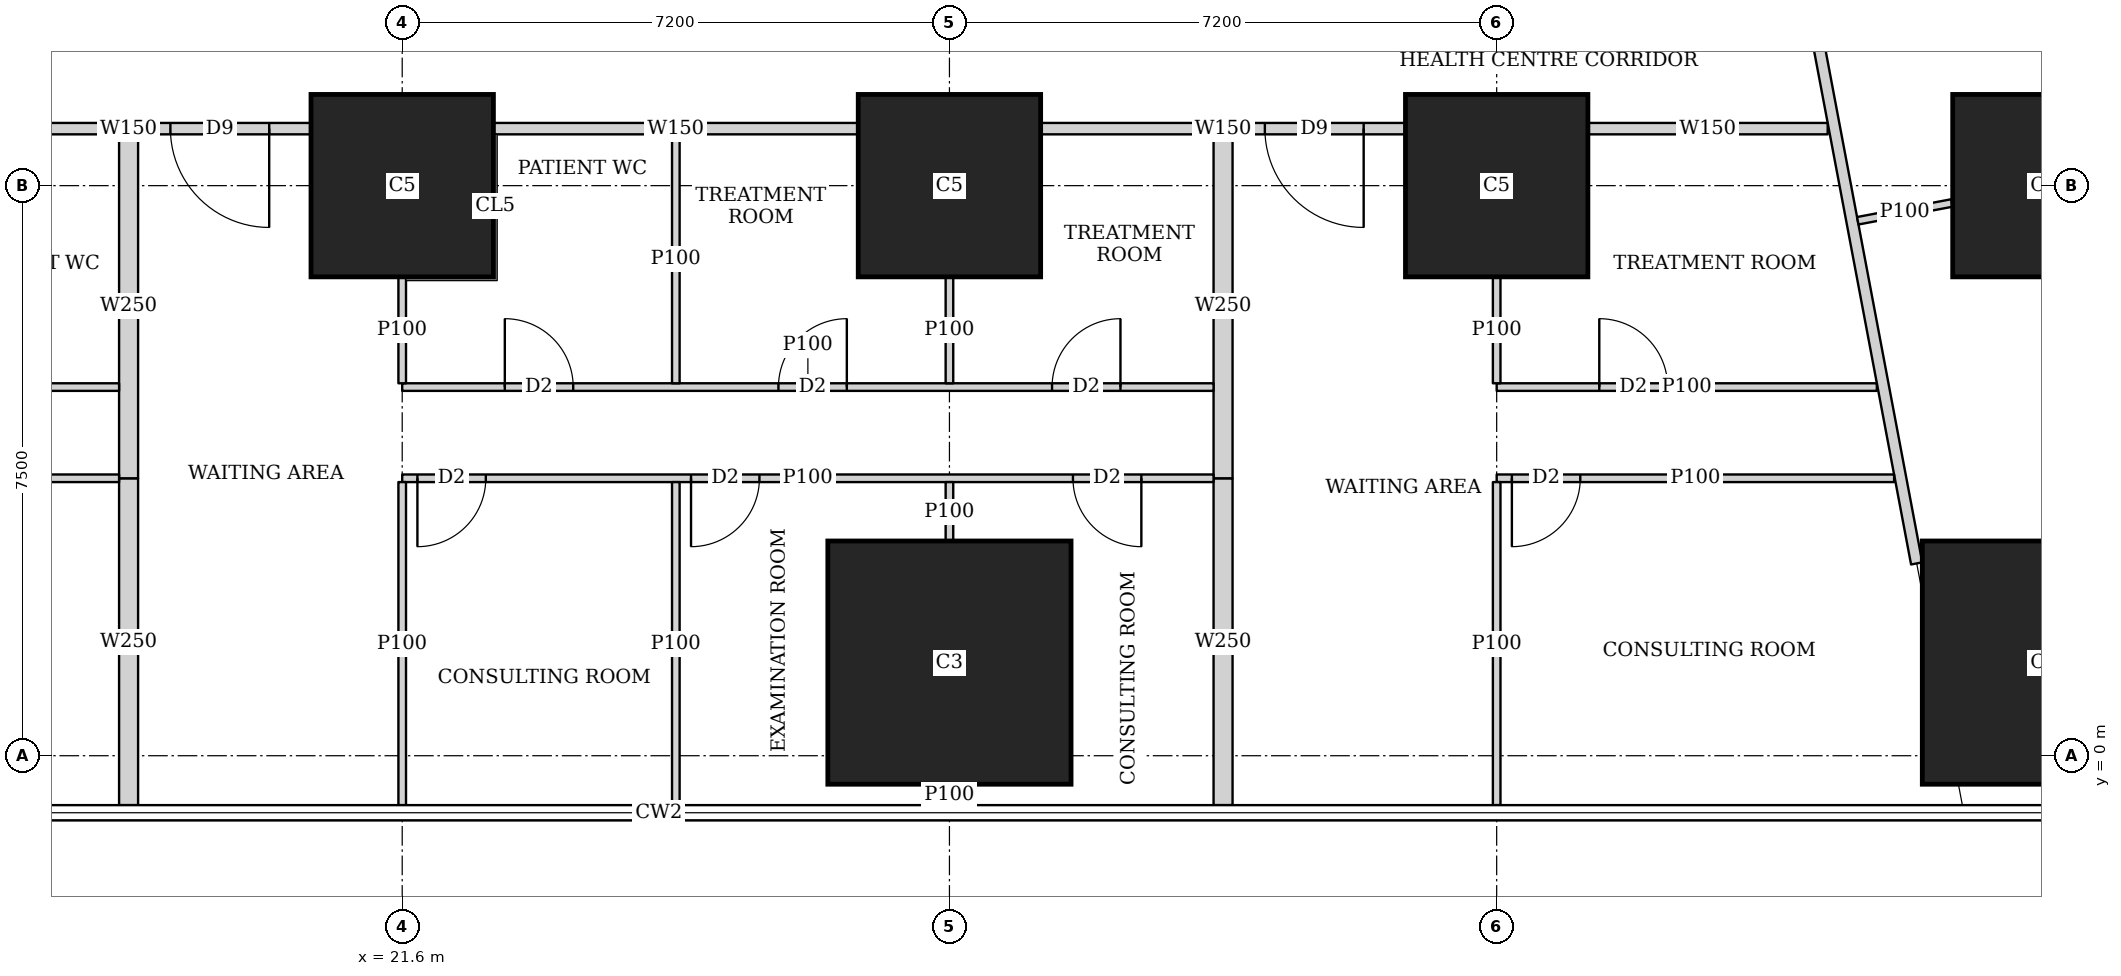
"""IFC4 building model, lengths in metres.
Left out: names, types, materials, properties, quantities, classifications, styles, units other than length and angle.
Written with IfcOpenShell. Run it as: python <this file> out.ifc"""

import sys

from ifc_helpers import new_model, si_unit, direction, frame, frame_2d, origin, origin_2d, place, context, subcontext, project, spatial, rectangle, extrude, element, fill, save


model = new_model("IFC4")
c1 = context("Model", 3, precision=1e-05, world=origin(), true_north=direction((0.0, 1.0)))
c2 = subcontext(c1, "Body", "Model", "MODEL_VIEW")
j1 = project(units=[si_unit("LENGTHUNIT", "METRE"), si_unit("PLANEANGLEUNIT", "RADIAN")], contexts=[c1])
p1 = place(None, origin())
s1 = spatial("IfcSite", under=j1, at=p1, CompositionType="ELEMENT")
p2 = place(p1, origin())
s2 = spatial("IfcBuilding", under=s1, at=p2, CompositionType="ELEMENT")
p3 = place(p2, frame((0.0, 0.0, 5.6)))
s3 = spatial("IfcBuildingStorey", under=s2, at=p3, CompositionType="ELEMENT", Elevation=5.6)
for number, where, z_axis, x_axis in (
    (1, (28.8, 1.225, 0.0), (0.0, 0.0, 1.0), (1.0, 0.0, 0.0)),
    (2, (43.2, 1.225, 0.0), (0.0, 0.0, 1.0), (1.0, 0.0, 0.0)),
):
    element("IfcColumn", number, at=place(p3, frame(where, z_axis=z_axis, x_axis=x_axis)), inside=s3, PredefinedType="COLUMN", context=c2, shape_type="SweptSolid", body=[
        extrude(rectangle(XDim=3.2, YDim=3.2, at=origin_2d()), origin(), (0.0, 0.0, 1.0), 4.5),
    ])
for number, where, z_axis, x_axis in (
    (3, (21.6, 7.5, 0.0), (0.0, 0.0, 1.0), (1.0, 0.0, 0.0)),
    (4, (28.8, 7.5, 0.0), (0.0, 0.0, 1.0), (1.0, 0.0, 0.0)),
    (5, (36.0, 7.5, 0.0), (0.0, 0.0, 1.0), (1.0, 0.0, 0.0)),
    (6, (43.2, 7.5, 0.0), (0.0, 0.0, 1.0), (1.0, 0.0, 0.0)),
):
    element("IfcColumn", number, at=place(p3, frame(where, z_axis=z_axis, x_axis=x_axis)), inside=s3, PredefinedType="COLUMN", context=c2, shape_type="SweptSolid", body=[
        extrude(rectangle(XDim=2.4, YDim=2.4, at=origin_2d()), origin(), (0.0, 0.0, 1.0), 4.5),
    ])
p4 = place(p3, frame((40.355, 8.25, 0.0), z_axis=(0.0, 0.0, 1.0), x_axis=(-1.0, 0.0, 0.0)))
e7 = element("IfcWall", 7, at=p4, inside=s3, PredefinedType="SOLIDWALL", context=c2, shape_type="SweptSolid", body=[
    extrude(rectangle(XDim=3.154, YDim=0.15, at=frame_2d((1.577, 0.0))), origin(), (0.0, 0.0, 1.0), 2.6),
])
p5 = place(p3, frame((34.799, 8.25, 0.0), z_axis=(0.0, 0.0, 1.0), x_axis=(-1.0, 0.0, 0.0)))
e8 = element("IfcWall", 8, at=p5, inside=s3, PredefinedType="SOLIDWALL", context=c2, shape_type="SweptSolid", body=[
    extrude(rectangle(XDim=4.798, YDim=0.15, at=frame_2d((2.399, 0.0))), origin(), (0.0, 0.0, 1.0), 2.6),
])
p6 = place(p5, frame((0.549, 0.0, 0.0)))
e9 = element("IfcOpeningElement", 9, at=p6, cuts=e8, PredefinedType="OPENING", context=c2, shape_type="SweptSolid", body=[
    extrude(rectangle(XDim=1.3, YDim=2.1, at=frame_2d((0.65, 1.05))), frame((0.0, 0.085, 0.0), z_axis=(0.0, -1.0, 0.0), x_axis=(1.0, 0.0, 0.0)), (0.0, 0.0, 1.0), 0.17),
])
p7 = place(p3, frame((27.599, 8.25, 0.0), z_axis=(0.0, 0.0, 1.0), x_axis=(-1.0, 0.0, 0.0)))
e10 = element("IfcWall", 10, at=p7, inside=s3, PredefinedType="SOLIDWALL", context=c2, shape_type="SweptSolid", body=[
    extrude(rectangle(XDim=4.798, YDim=0.15, at=frame_2d((2.399, 0.0))), origin(), (0.0, 0.0, 1.0), 2.6),
])
p8 = place(p3, frame((20.399, 8.25, 0.0), z_axis=(0.0, 0.0, 1.0), x_axis=(-1.0, 0.0, 0.0)))
e11 = element("IfcWall", 11, at=p8, inside=s3, PredefinedType="SOLIDWALL", context=c2, shape_type="SweptSolid", body=[
    extrude(rectangle(XDim=4.798, YDim=0.15, at=frame_2d((2.399, 0.0))), origin(), (0.0, 0.0, 1.0), 2.6),
])
p9 = place(p8, frame((0.549, 0.0, 0.0)))
e12 = element("IfcOpeningElement", 12, at=p9, cuts=e11, PredefinedType="OPENING", context=c2, shape_type="SweptSolid", body=[
    extrude(rectangle(XDim=1.3, YDim=2.1, at=frame_2d((0.65, 1.05))), frame((0.0, 0.085, 0.0), z_axis=(0.0, -1.0, 0.0), x_axis=(1.0, 0.0, 0.0)), (0.0, 0.0, 1.0), 0.17),
])
p10 = place(p3, frame((35.151, 36.285, 0.0), z_axis=(0.0, 0.0, 1.0), x_axis=(0.18558085056, -0.982628998099, 0.0)))
e13 = element("IfcWall", 13, at=p10, inside=s3, PredefinedType="SOLIDWALL", context=c2, shape_type="SweptSolid", body=[
    extrude(rectangle(XDim=34.352, YDim=0.15, at=frame_2d((17.176, 0.0))), origin(), (0.0, 0.0, 1.0), 2.4),
])
p11 = place(p10, frame((13.189, 0.0, 0.0)))
e14 = element("IfcOpeningElement", 14, at=p11, cuts=e13, PredefinedType="OPENING", context=c2, shape_type="SweptSolid", body=[
    extrude(rectangle(XDim=1.3, YDim=2.1, at=frame_2d((0.65, 1.05))), frame((0.0, 0.085, 0.0), z_axis=(0.0, -1.0, 0.0), x_axis=(1.0, 0.0, 0.0)), (0.0, 0.0, 1.0), 0.17),
])
p12 = place(p10, frame((19.443, 0.0, 0.0)))
e15 = element("IfcOpeningElement", 15, at=p12, cuts=e13, PredefinedType="OPENING", context=c2, shape_type="SweptSolid", body=[
    extrude(rectangle(XDim=1.3, YDim=2.1, at=frame_2d((0.65, 1.05))), frame((0.0, 0.085, 0.0), z_axis=(0.0, -1.0, 0.0), x_axis=(1.0, 0.0, 0.0)), (0.0, 0.0, 1.0), 0.17),
])
p13 = place(p10, frame((25.444, 0.0, 0.0)))
e16 = element("IfcOpeningElement", 16, at=p13, cuts=e13, PredefinedType="OPENING", context=c2, shape_type="SweptSolid", body=[
    extrude(rectangle(XDim=1.3, YDim=2.1, at=frame_2d((0.65, 1.05))), frame((0.0, 0.085, 0.0), z_axis=(0.0, -1.0, 0.0), x_axis=(1.0, 0.0, 0.0)), (0.0, 0.0, 1.0), 0.17),
])
p14 = place(p3, frame((17.875, 3.65, 0.0), z_axis=(0.0, 0.0, 1.0), x_axis=(-1.0, 0.0, 0.0)))
e17 = element("IfcWall", 17, at=p14, inside=s3, PredefinedType="PARTITIONING", context=c2, shape_type="SweptSolid", body=[
    extrude(rectangle(XDim=3.475, YDim=0.1, at=frame_2d((1.738, 0.0))), origin(), (0.0, 0.0, 1.0), 2.6),
])
p15 = place(p14, frame((0.95, 0.0, 0.0)))
e18 = element("IfcOpeningElement", 18, at=p15, cuts=e17, PredefinedType="OPENING", context=c2, shape_type="SweptSolid", body=[
    extrude(rectangle(XDim=0.9, YDim=2.1, at=frame_2d((0.45, 1.05))), frame((0.0, 0.06, 0.0), z_axis=(0.0, -1.0, 0.0), x_axis=(1.0, 0.0, 0.0)), (0.0, 0.0, 1.0), 0.12),
])
p16 = place(p3, frame((17.875, 4.85, 0.0), z_axis=(0.0, 0.0, 1.0), x_axis=(-1.0, 0.0, 0.0)))
e19 = element("IfcWall", 19, at=p16, inside=s3, PredefinedType="PARTITIONING", context=c2, shape_type="SweptSolid", body=[
    extrude(rectangle(XDim=3.475, YDim=0.1, at=frame_2d((1.738, 0.0))), origin(), (0.0, 0.0, 1.0), 2.6),
])
p17 = place(p16, frame((1.225, 0.0, 0.0)))
e20 = element("IfcOpeningElement", 20, at=p17, cuts=e19, PredefinedType="OPENING", context=c2, shape_type="SweptSolid", body=[
    extrude(rectangle(XDim=0.9, YDim=2.1, at=frame_2d((0.45, 1.05))), frame((0.0, 0.06, 0.0), z_axis=(0.0, -1.0, 0.0), x_axis=(1.0, 0.0, 0.0)), (0.0, 0.0, 1.0), 0.12),
])
p18 = place(p3, frame((32.275, 3.65, 0.0), z_axis=(0.0, 0.0, 1.0), x_axis=(-1.0, 0.0, 0.0)))
e21 = element("IfcWall", 21, at=p18, inside=s3, PredefinedType="PARTITIONING", context=c2, shape_type="SweptSolid", body=[
    extrude(rectangle(XDim=10.675, YDim=0.1, at=frame_2d((5.337, 0.0))), origin(), (0.0, 0.0, 1.0), 2.6),
])
p19 = place(p18, frame((9.575, 0.0, 0.0)))
e22 = element("IfcOpeningElement", 22, at=p19, cuts=e21, PredefinedType="OPENING", context=c2, shape_type="SweptSolid", body=[
    extrude(rectangle(XDim=0.9, YDim=2.1, at=frame_2d((0.45, 1.05))), frame((0.0, 0.06, 0.0), z_axis=(0.0, -1.0, 0.0), x_axis=(1.0, 0.0, 0.0)), (0.0, 0.0, 1.0), 0.12),
])
p20 = place(p18, frame((5.975, 0.0, 0.0)))
e23 = element("IfcOpeningElement", 23, at=p20, cuts=e21, PredefinedType="OPENING", context=c2, shape_type="SweptSolid", body=[
    extrude(rectangle(XDim=0.9, YDim=2.1, at=frame_2d((0.45, 1.05))), frame((0.0, 0.06, 0.0), z_axis=(0.0, -1.0, 0.0), x_axis=(1.0, 0.0, 0.0)), (0.0, 0.0, 1.0), 0.12),
])
p21 = place(p18, frame((0.95, 0.0, 0.0)))
e24 = element("IfcOpeningElement", 24, at=p21, cuts=e21, PredefinedType="OPENING", context=c2, shape_type="SweptSolid", body=[
    extrude(rectangle(XDim=0.9, YDim=2.1, at=frame_2d((0.45, 1.05))), frame((0.0, 0.06, 0.0), z_axis=(0.0, -1.0, 0.0), x_axis=(1.0, 0.0, 0.0)), (0.0, 0.0, 1.0), 0.12),
])
p22 = place(p3, frame((32.275, 4.85, 0.0), z_axis=(0.0, 0.0, 1.0), x_axis=(-1.0, 0.0, 0.0)))
e25 = element("IfcWall", 25, at=p22, inside=s3, PredefinedType="PARTITIONING", context=c2, shape_type="SweptSolid", body=[
    extrude(rectangle(XDim=10.675, YDim=0.1, at=frame_2d((5.337, 0.0))), origin(), (0.0, 0.0, 1.0), 2.6),
])
p23 = place(p22, frame((8.425, 0.0, 0.0)))
e26 = element("IfcOpeningElement", 26, at=p23, cuts=e25, PredefinedType="OPENING", context=c2, shape_type="SweptSolid", body=[
    extrude(rectangle(XDim=0.9, YDim=2.1, at=frame_2d((0.45, 1.05))), frame((0.0, 0.06, 0.0), z_axis=(0.0, -1.0, 0.0), x_axis=(1.0, 0.0, 0.0)), (0.0, 0.0, 1.0), 0.12),
])
p24 = place(p22, frame((4.825, 0.0, 0.0)))
e27 = element("IfcOpeningElement", 27, at=p24, cuts=e25, PredefinedType="OPENING", context=c2, shape_type="SweptSolid", body=[
    extrude(rectangle(XDim=0.9, YDim=2.1, at=frame_2d((0.45, 1.05))), frame((0.0, 0.06, 0.0), z_axis=(0.0, -1.0, 0.0), x_axis=(1.0, 0.0, 0.0)), (0.0, 0.0, 1.0), 0.12),
])
p25 = place(p22, frame((1.225, 0.0, 0.0)))
e28 = element("IfcOpeningElement", 28, at=p25, cuts=e25, PredefinedType="OPENING", context=c2, shape_type="SweptSolid", body=[
    extrude(rectangle(XDim=0.9, YDim=2.1, at=frame_2d((0.45, 1.05))), frame((0.0, 0.06, 0.0), z_axis=(0.0, -1.0, 0.0), x_axis=(1.0, 0.0, 0.0)), (0.0, 0.0, 1.0), 0.12),
])
for number, where, z_axis, x_axis in (
    (29, (21.6, -0.65, 0.0), (0.0, 0.0, 1.0), (0.0, 1.0, 0.0)),
    (30, (25.2, -0.65, 0.0), (0.0, 0.0, 1.0), (0.0, 1.0, 0.0)),
):
    element("IfcWall", number, at=place(p3, frame(where, z_axis=z_axis, x_axis=x_axis)), inside=s3, PredefinedType="PARTITIONING", context=c2, shape_type="SweptSolid", body=[
        extrude(rectangle(XDim=4.25, YDim=0.1, at=frame_2d((2.125, 0.0))), origin(), (0.0, 0.0, 1.0), 2.4),
    ])
p26 = place(p3, frame((28.8, -0.65, 0.0), z_axis=(0.0, 0.0, 1.0), x_axis=(0.0, 1.0, 0.0)))
e31 = element("IfcWall", 31, at=p26, inside=s3, PredefinedType="PARTITIONING", context=c2, shape_type="SweptSolid", body=[
    extrude(rectangle(XDim=0.274, YDim=0.1, at=frame_2d((0.137, 0.0))), origin(), (0.0, 0.0, 1.0), 4.2),
])
p27 = place(p3, frame((28.8, 2.826, 0.0), z_axis=(0.0, 0.0, 1.0), x_axis=(0.0, 1.0, 0.0)))
e32 = element("IfcWall", 32, at=p27, inside=s3, PredefinedType="PARTITIONING", context=c2, shape_type="SweptSolid", body=[
    extrude(rectangle(XDim=0.774, YDim=0.1, at=frame_2d((0.387, 0.0))), origin(), (0.0, 0.0, 1.0), 2.6),
])
p28 = place(p3, frame((21.6, 4.9, 0.0), z_axis=(0.0, 0.0, 1.0), x_axis=(0.0, 1.0, 0.0)))
e33 = element("IfcWall", 33, at=p28, inside=s3, PredefinedType="PARTITIONING", context=c2, shape_type="SweptSolid", body=[
    extrude(rectangle(XDim=1.399, YDim=0.1, at=frame_2d((0.7, 0.0))), origin(), (0.0, 0.0, 1.0), 4.2),
])
p29 = place(p3, frame((25.2, 4.9, 0.0), z_axis=(0.0, 0.0, 1.0), x_axis=(0.0, 1.0, 0.0)))
e34 = element("IfcWall", 34, at=p29, inside=s3, PredefinedType="PARTITIONING", context=c2, shape_type="SweptSolid", body=[
    extrude(rectangle(XDim=3.275, YDim=0.1, at=frame_2d((1.638, 0.0))), origin(), (0.0, 0.0, 1.0), 2.6),
])
p30 = place(p3, frame((28.8, 4.9, 0.0), z_axis=(0.0, 0.0, 1.0), x_axis=(0.0, 1.0, 0.0)))
e35 = element("IfcWall", 35, at=p30, inside=s3, PredefinedType="PARTITIONING", context=c2, shape_type="SweptSolid", body=[
    extrude(rectangle(XDim=1.399, YDim=0.1, at=frame_2d((0.7, 0.0))), origin(), (0.0, 0.0, 1.0), 2.6),
])
p31 = place(p3, frame((18.0, -0.65, 0.0), z_axis=(0.0, 0.0, 1.0), x_axis=(0.0, 1.0, 0.0)))
e36 = element("IfcWall", 36, at=p31, inside=s3, PredefinedType="SOLIDWALL", context=c2, shape_type="SweptSolid", body=[
    extrude(rectangle(XDim=4.3, YDim=0.25, at=frame_2d((2.15, 0.0))), origin(), (0.0, 0.0, 1.0), 2.4),
])
p32 = place(p3, frame((18.0, 3.65, 0.0), z_axis=(0.0, 0.0, 1.0), x_axis=(0.0, 1.0, 0.0)))
e37 = element("IfcWall", 37, at=p32, inside=s3, PredefinedType="SOLIDWALL", context=c2, shape_type="SweptSolid", body=[
    extrude(rectangle(XDim=4.525, YDim=0.25, at=frame_2d((2.263, 0.0))), origin(), (0.0, 0.0, 1.0), 2.6),
])
p33 = place(p3, frame((41.229, 3.65, 0.0), z_axis=(0.0, 0.0, 1.0), x_axis=(-1.0, 0.0, 0.0)))
e38 = element("IfcWall", 38, at=p33, inside=s3, PredefinedType="PARTITIONING", context=c2, shape_type="SweptSolid", body=[
    extrude(rectangle(XDim=5.229, YDim=0.1, at=frame_2d((2.615, 0.0))), origin(), (0.0, 0.0, 1.0), 4.2),
])
p34 = place(p33, frame((4.129, 0.0, 0.0)))
e39 = element("IfcOpeningElement", 39, at=p34, cuts=e38, PredefinedType="OPENING", context=c2, shape_type="SweptSolid", body=[
    extrude(rectangle(XDim=0.9, YDim=2.1, at=frame_2d((0.45, 1.05))), frame((0.0, 0.06, 0.0), z_axis=(0.0, -1.0, 0.0), x_axis=(1.0, 0.0, 0.0)), (0.0, 0.0, 1.0), 0.12),
])
p35 = place(p3, frame((41.002, 4.85, 0.0), z_axis=(0.0, 0.0, 1.0), x_axis=(-1.0, 0.0, 0.0)))
e40 = element("IfcWall", 40, at=p35, inside=s3, PredefinedType="PARTITIONING", context=c2, shape_type="SweptSolid", body=[
    extrude(rectangle(XDim=5.002, YDim=0.1, at=frame_2d((2.501, 0.0))), origin(), (0.0, 0.0, 1.0), 4.2),
])
p36 = place(p35, frame((2.752, 0.0, 0.0)))
e41 = element("IfcOpeningElement", 41, at=p36, cuts=e40, PredefinedType="OPENING", context=c2, shape_type="SweptSolid", body=[
    extrude(rectangle(XDim=0.9, YDim=2.1, at=frame_2d((0.45, 1.05))), frame((0.0, 0.06, 0.0), z_axis=(0.0, -1.0, 0.0), x_axis=(1.0, 0.0, 0.0)), (0.0, 0.0, 1.0), 0.12),
])
p37 = place(p3, frame((36.0, -0.65, 0.0), z_axis=(0.0, 0.0, 1.0), x_axis=(0.0, 1.0, 0.0)))
e42 = element("IfcWall", 42, at=p37, inside=s3, PredefinedType="PARTITIONING", context=c2, shape_type="SweptSolid", body=[
    extrude(rectangle(XDim=4.25, YDim=0.1, at=frame_2d((2.125, 0.0))), origin(), (0.0, 0.0, 1.0), 2.4),
])
p38 = place(p3, frame((36.0, 4.9, 0.0), z_axis=(0.0, 0.0, 1.0), x_axis=(0.0, 1.0, 0.0)))
e43 = element("IfcWall", 43, at=p38, inside=s3, PredefinedType="PARTITIONING", context=c2, shape_type="SweptSolid", body=[
    extrude(rectangle(XDim=1.399, YDim=0.1, at=frame_2d((0.7, 0.0))), origin(), (0.0, 0.0, 1.0), 4.2),
])
p39 = place(p3, frame((32.4, -0.65, 0.0), z_axis=(0.0, 0.0, 1.0), x_axis=(0.0, 1.0, 0.0)))
e44 = element("IfcWall", 44, at=p39, inside=s3, PredefinedType="SOLIDWALL", context=c2, shape_type="SweptSolid", body=[
    extrude(rectangle(XDim=4.3, YDim=0.25, at=frame_2d((2.15, 0.0))), origin(), (0.0, 0.0, 1.0), 2.4),
])
p40 = place(p3, frame((32.4, 3.65, 0.0), z_axis=(0.0, 0.0, 1.0), x_axis=(0.0, 1.0, 0.0)))
e45 = element("IfcWall", 45, at=p40, inside=s3, PredefinedType="SOLIDWALL", context=c2, shape_type="SweptSolid", body=[
    extrude(rectangle(XDim=4.525, YDim=0.25, at=frame_2d((2.263, 0.0))), origin(), (0.0, 0.0, 1.0), 2.6),
])
p41 = place(p3, frame((41.99, 7.272, 0.0), z_axis=(0.0, 0.0, 1.0), x_axis=(-0.982645675559, -0.185492523583, 0.0)))
e46 = element("IfcWall", 46, at=p41, inside=s3, PredefinedType="PARTITIONING", context=c2, shape_type="SweptSolid", body=[
    extrude(rectangle(XDim=1.261, YDim=0.1, at=frame_2d((0.63, 0.0))), origin(), (0.0, 0.0, 1.0), 2.6),
])
p42 = place(p19, origin())
e47 = element("IfcDoor", 47, at=p42, inside=s3, OperationType="SINGLE_SWING_RIGHT", PredefinedType="DOOR", context=c2, shape_type="SweptSolid", body=[
    extrude(rectangle(XDim=0.9, YDim=2.1, at=frame_2d((0.45, 1.05))), frame((0.0, 0.025, 0.0), z_axis=(0.0, -1.0, 0.0), x_axis=(1.0, 0.0, 0.0)), (0.0, 0.0, 1.0), 0.05),
])
fill(e22, e47)
p43 = place(p20, origin())
e48 = element("IfcDoor", 48, at=p43, inside=s3, OperationType="SINGLE_SWING_RIGHT", PredefinedType="DOOR", context=c2, shape_type="SweptSolid", body=[
    extrude(rectangle(XDim=0.9, YDim=2.1, at=frame_2d((0.45, 1.05))), frame((0.0, 0.025, 0.0), z_axis=(0.0, -1.0, 0.0), x_axis=(1.0, 0.0, 0.0)), (0.0, 0.0, 1.0), 0.05),
])
fill(e23, e48)
p44 = place(p21, origin())
e49 = element("IfcDoor", 49, at=p44, inside=s3, OperationType="SINGLE_SWING_LEFT", PredefinedType="DOOR", context=c2, shape_type="SweptSolid", body=[
    extrude(rectangle(XDim=0.9, YDim=2.1, at=frame_2d((0.45, 1.05))), frame((0.0, 0.025, 0.0), z_axis=(0.0, -1.0, 0.0), x_axis=(1.0, 0.0, 0.0)), (0.0, 0.0, 1.0), 0.05),
])
fill(e24, e49)
p45 = place(p23, origin())
e50 = element("IfcDoor", 50, at=p45, inside=s3, OperationType="SINGLE_SWING_LEFT", PredefinedType="DOOR", context=c2, shape_type="SweptSolid", body=[
    extrude(rectangle(XDim=0.9, YDim=2.1, at=frame_2d((0.45, 1.05))), frame((0.0, 0.025, 0.0), z_axis=(0.0, -1.0, 0.0), x_axis=(1.0, 0.0, 0.0)), (0.0, 0.0, 1.0), 0.05),
])
fill(e26, e50)
p46 = place(p24, origin())
e51 = element("IfcDoor", 51, at=p46, inside=s3, OperationType="SINGLE_SWING_RIGHT", PredefinedType="DOOR", context=c2, shape_type="SweptSolid", body=[
    extrude(rectangle(XDim=0.9, YDim=2.1, at=frame_2d((0.45, 1.05))), frame((0.0, 0.025, 0.0), z_axis=(0.0, -1.0, 0.0), x_axis=(1.0, 0.0, 0.0)), (0.0, 0.0, 1.0), 0.05),
])
fill(e27, e51)
p47 = place(p25, origin())
e52 = element("IfcDoor", 52, at=p47, inside=s3, OperationType="SINGLE_SWING_RIGHT", PredefinedType="DOOR", context=c2, shape_type="SweptSolid", body=[
    extrude(rectangle(XDim=0.9, YDim=2.1, at=frame_2d((0.45, 1.05))), frame((0.0, 0.025, 0.0), z_axis=(0.0, -1.0, 0.0), x_axis=(1.0, 0.0, 0.0)), (0.0, 0.0, 1.0), 0.05),
])
fill(e28, e52)
p48 = place(p9, origin())
e53 = element("IfcDoor", 53, at=p48, inside=s3, OperationType="DOUBLE_DOOR_SINGLE_SWING", PredefinedType="DOOR", context=c2, shape_type="SweptSolid", body=[
    extrude(rectangle(XDim=1.3, YDim=2.1, at=frame_2d((0.65, 1.05))), frame((0.0, 0.025, 0.0), z_axis=(0.0, -1.0, 0.0), x_axis=(1.0, 0.0, 0.0)), (0.0, 0.0, 1.0), 0.05),
])
fill(e12, e53)
p49 = place(p34, origin())
e54 = element("IfcDoor", 54, at=p49, inside=s3, OperationType="SINGLE_SWING_RIGHT", PredefinedType="DOOR", context=c2, shape_type="SweptSolid", body=[
    extrude(rectangle(XDim=0.9, YDim=2.1, at=frame_2d((0.45, 1.05))), frame((0.0, 0.025, 0.0), z_axis=(0.0, -1.0, 0.0), x_axis=(1.0, 0.0, 0.0)), (0.0, 0.0, 1.0), 0.05),
])
fill(e39, e54)
p50 = place(p36, origin())
e55 = element("IfcDoor", 55, at=p50, inside=s3, OperationType="SINGLE_SWING_LEFT", PredefinedType="DOOR", context=c2, shape_type="SweptSolid", body=[
    extrude(rectangle(XDim=0.9, YDim=2.1, at=frame_2d((0.45, 1.05))), frame((0.0, 0.025, 0.0), z_axis=(0.0, -1.0, 0.0), x_axis=(1.0, 0.0, 0.0)), (0.0, 0.0, 1.0), 0.05),
])
fill(e41, e55)
p51 = place(p6, origin())
e56 = element("IfcDoor", 56, at=p51, inside=s3, OperationType="DOUBLE_DOOR_SINGLE_SWING", PredefinedType="DOOR", context=c2, shape_type="SweptSolid", body=[
    extrude(rectangle(XDim=1.3, YDim=2.1, at=frame_2d((0.65, 1.05))), frame((0.0, 0.025, 0.0), z_axis=(0.0, -1.0, 0.0), x_axis=(1.0, 0.0, 0.0)), (0.0, 0.0, 1.0), 0.05),
])
fill(e9, e56)
save(model, sys.argv[1])
